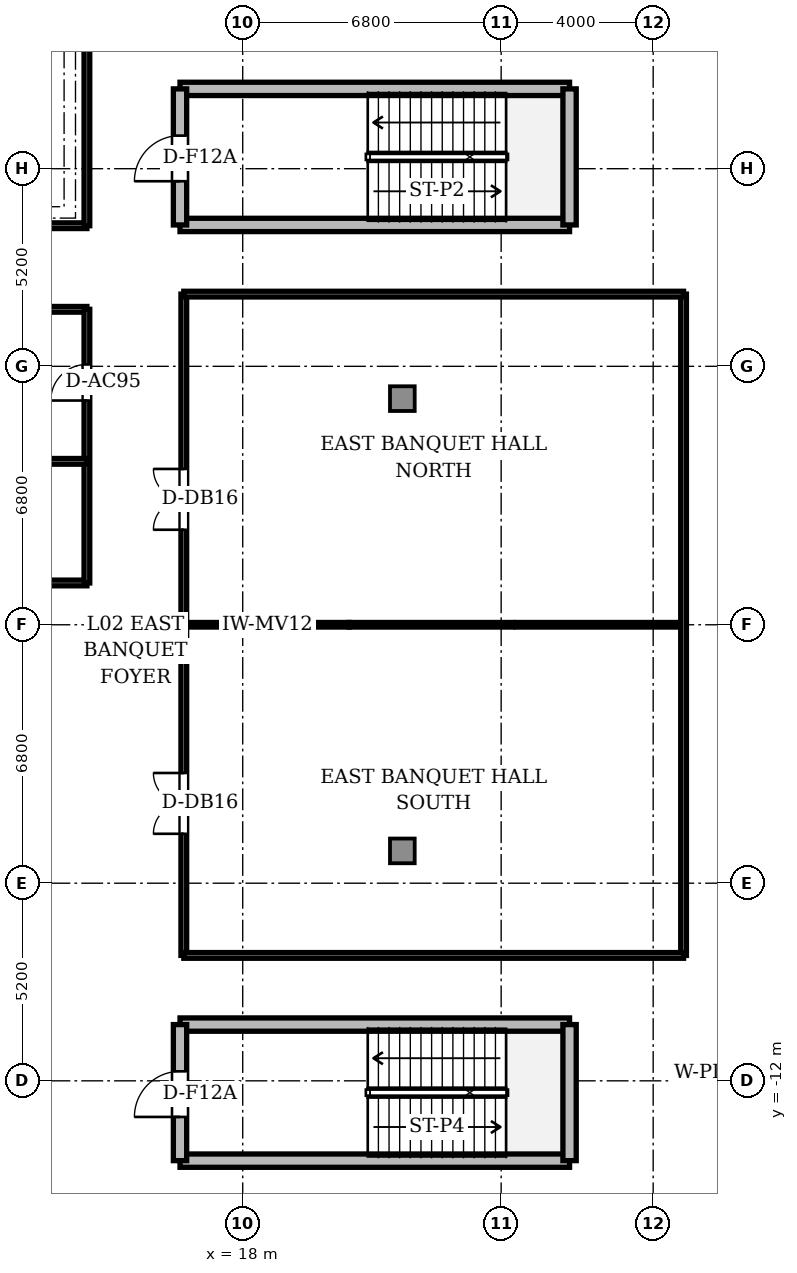
"""IFC4 building model, lengths in metres.
Left out: names, types, materials, properties, quantities, classifications, styles, units other than length and angle.
Written with IfcOpenShell. Run it as: python <this file> out.ifc"""

import sys

from ifc_helpers import new_model, si_unit, direction, frame, frame_2d, origin, origin_2d, place, context, subcontext, project, spatial, rectangle, hollow_rectangle, extrude, source, transform, mapped, element, fill, save


model = new_model("IFC4")
c1 = context("Model", 3, precision=1e-05, world=origin(), true_north=direction((0.0, 1.0)))
c2 = subcontext(c1, "Body", "Model", "MODEL_VIEW")
j1 = project(units=[si_unit("LENGTHUNIT", "METRE"), si_unit("PLANEANGLEUNIT", "RADIAN")], contexts=[c1])
p1 = place(None, origin())
s1 = spatial("IfcSite", under=j1, at=p1, CompositionType="ELEMENT")
p2 = place(p1, origin())
s2 = spatial("IfcBuilding", under=s1, at=p2, CompositionType="ELEMENT")
p3 = place(p2, frame((0.0, 0.0, 9.3)))
s3 = spatial("IfcBuildingStorey", under=s2, at=p3, CompositionType="ELEMENT", Elevation=9.3)
m1 = source(origin(), c2, "Body", "SweptSolid", [
    extrude(hollow_rectangle(XDim=0.65, YDim=0.65, WallThickness=0.032, at=origin_2d()), origin(), (0.0, 0.0, 1.0), 4.4),
])
for number, where, z_axis, x_axis in (
    (1, (22.2, -5.95, 0.0), (0.0, 0.0, 1.0), (1.0, 0.0, 0.0)),
    (2, (22.2, 5.95, 0.0), (0.0, 0.0, 1.0), (1.0, 0.0, 0.0)),
):
    element("IfcColumn", number, at=place(p3, frame(where, z_axis=z_axis, x_axis=x_axis)), inside=s3, PredefinedType="COLUMN", context=c2, shape_type="MappedRepresentation", body=[
        mapped(m1, transform((0.0, 0.0, 0.0), scale=1.0)),
    ])
for number, where, z_axis, x_axis in (
    (3, (16.35, 14.1, 0.0), (0.0, 0.0, 1.0), (1.0, 0.0, 0.0)),
    (4, (16.35, 10.52, 0.0), (0.0, 0.0, 1.0), (1.0, 0.0, 0.0)),
):
    element("IfcWall", number, at=place(p3, frame(where, z_axis=z_axis, x_axis=x_axis)), inside=s3, PredefinedType="SHEAR", context=c2, shape_type="SweptSolid", body=[
        extrude(rectangle(XDim=10.25, YDim=0.35, at=frame_2d((5.125, 0.0))), origin(), (0.0, 0.0, 1.0), 4.4),
    ])
p4 = place(p3, frame((16.35, 10.52, 0.0), z_axis=(0.0, 0.0, 1.0), x_axis=(0.0, 1.0, 0.0)))
e5 = element("IfcWall", 5, at=p4, inside=s3, PredefinedType="SHEAR", context=c2, shape_type="SweptSolid", body=[
    extrude(rectangle(XDim=3.58, YDim=0.35, at=frame_2d((1.79, 0.0))), origin(), (0.0, 0.0, 1.0), 4.4),
])
p5 = place(p4, frame((1.15, 0.0, 0.0)))
e6 = element("IfcOpeningElement", 6, at=p5, cuts=e5, PredefinedType="OPENING", context=c2, shape_type="SweptSolid", body=[
    extrude(rectangle(XDim=1.2, YDim=2.2, at=frame_2d((0.6, 1.1))), frame((0.0, 0.185, 0.0), z_axis=(0.0, -1.0, 0.0), x_axis=(1.0, 0.0, 0.0)), (0.0, 0.0, 1.0), 0.37),
])
p6 = place(p3, frame((26.6, 10.52, 0.0), z_axis=(0.0, 0.0, 1.0), x_axis=(0.0, 1.0, 0.0)))
e7 = element("IfcWall", 7, at=p6, inside=s3, PredefinedType="SHEAR", context=c2, shape_type="SweptSolid", body=[
    extrude(rectangle(XDim=3.58, YDim=0.35, at=frame_2d((1.79, 0.0))), origin(), (0.0, 0.0, 1.0), 4.4),
])
for number, where, z_axis, x_axis in (
    (8, (16.35, -10.52, 0.0), (0.0, 0.0, 1.0), (1.0, 0.0, 0.0)),
    (9, (16.35, -14.1, 0.0), (0.0, 0.0, 1.0), (1.0, 0.0, 0.0)),
):
    element("IfcWall", number, at=place(p3, frame(where, z_axis=z_axis, x_axis=x_axis)), inside=s3, PredefinedType="SHEAR", context=c2, shape_type="SweptSolid", body=[
        extrude(rectangle(XDim=10.25, YDim=0.35, at=frame_2d((5.125, 0.0))), origin(), (0.0, 0.0, 1.0), 4.4),
    ])
p7 = place(p3, frame((16.35, -14.1, 0.0), z_axis=(0.0, 0.0, 1.0), x_axis=(0.0, 1.0, 0.0)))
e10 = element("IfcWall", 10, at=p7, inside=s3, PredefinedType="SHEAR", context=c2, shape_type="SweptSolid", body=[
    extrude(rectangle(XDim=3.58, YDim=0.35, at=frame_2d((1.79, 0.0))), origin(), (0.0, 0.0, 1.0), 4.4),
])
p8 = place(p7, frame((1.15, 0.0, 0.0)))
e11 = element("IfcOpeningElement", 11, at=p8, cuts=e10, PredefinedType="OPENING", context=c2, shape_type="SweptSolid", body=[
    extrude(rectangle(XDim=1.2, YDim=2.2, at=frame_2d((0.6, 1.1))), frame((0.0, 0.185, 0.0), z_axis=(0.0, -1.0, 0.0), x_axis=(1.0, 0.0, 0.0)), (0.0, 0.0, 1.0), 0.37),
])
p9 = place(p3, frame((26.6, -14.1, 0.0), z_axis=(0.0, 0.0, 1.0), x_axis=(0.0, 1.0, 0.0)))
e12 = element("IfcWall", 12, at=p9, inside=s3, PredefinedType="SHEAR", context=c2, shape_type="SweptSolid", body=[
    extrude(rectangle(XDim=3.58, YDim=0.35, at=frame_2d((1.79, 0.0))), origin(), (0.0, 0.0, 1.0), 4.4),
])
p10 = place(p3, frame((4.4, 10.5, 0.0), z_axis=(0.0, 0.0, 1.0), x_axis=(1.0, 0.0, 0.0)))
e13 = element("IfcWall", 13, at=p10, inside=s3, PredefinedType="PARTITIONING", context=c2, shape_type="SweptSolid", body=[
    extrude(rectangle(XDim=9.5, YDim=0.15, at=frame_2d((4.75, 0.0))), origin(), (0.0, 0.0, 1.0), 3.95),
])
p11 = place(p10, frame((3.8, 0.0, 0.0)))
e14 = element("IfcOpeningElement", 14, at=p11, cuts=e13, PredefinedType="OPENING", context=c2, shape_type="SweptSolid", body=[
    extrude(rectangle(XDim=1.8, YDim=2.35, at=frame_2d((0.9, 1.175))), frame((0.0, 0.085, 0.0), z_axis=(0.0, -1.0, 0.0), x_axis=(1.0, 0.0, 0.0)), (0.0, 0.0, 1.0), 0.17),
])
p12 = place(p3, frame((13.9, 10.5, 0.0), z_axis=(0.0, 0.0, 1.0), x_axis=(0.0, 1.0, 0.0)))
e15 = element("IfcWall", 15, at=p12, inside=s3, PredefinedType="PARTITIONING", context=c2, shape_type="SweptSolid", body=[
    extrude(rectangle(XDim=11.2, YDim=0.15, at=frame_2d((5.6, 0.0))), origin(), (0.0, 0.0, 1.0), 3.95),
])
p13 = place(p3, frame((16.45, -8.7, 0.0), z_axis=(0.0, 0.0, 1.0), x_axis=(0.0, 1.0, 0.0)))
e16 = element("IfcWall", 16, at=p13, inside=s3, PredefinedType="PARTITIONING", context=c2, shape_type="SweptSolid", body=[
    extrude(rectangle(XDim=17.4, YDim=0.15, at=frame_2d((8.7, 0.0))), origin(), (0.0, 0.0, 1.0), 3.95),
])
p14 = place(p13, frame((11.2, 0.0, 0.0)))
e17 = element("IfcOpeningElement", 17, at=p14, cuts=e16, PredefinedType="OPENING", context=c2, shape_type="SweptSolid", body=[
    extrude(rectangle(XDim=1.6, YDim=2.25, at=frame_2d((0.8, 1.125))), frame((0.0, 0.085, 0.0), z_axis=(0.0, -1.0, 0.0), x_axis=(1.0, 0.0, 0.0)), (0.0, 0.0, 1.0), 0.17),
])
p15 = place(p13, frame((3.2, 0.0, 0.0)))
e18 = element("IfcOpeningElement", 18, at=p15, cuts=e16, PredefinedType="OPENING", context=c2, shape_type="SweptSolid", body=[
    extrude(rectangle(XDim=1.6, YDim=2.25, at=frame_2d((0.8, 1.125))), frame((0.0, 0.085, 0.0), z_axis=(0.0, -1.0, 0.0), x_axis=(1.0, 0.0, 0.0)), (0.0, 0.0, 1.0), 0.17),
])
p16 = place(p3, frame((29.6, -8.7, 0.0), z_axis=(0.0, 0.0, 1.0), x_axis=(0.0, 1.0, 0.0)))
e19 = element("IfcWall", 19, at=p16, inside=s3, PredefinedType="PARTITIONING", context=c2, shape_type="SweptSolid", body=[
    extrude(rectangle(XDim=17.4, YDim=0.15, at=frame_2d((8.7, 0.0))), origin(), (0.0, 0.0, 1.0), 3.95),
])
for number, where, z_axis, x_axis in (
    (20, (16.45, 8.7, 0.0), (0.0, 0.0, 1.0), (1.0, 0.0, 0.0)),
    (21, (16.45, -8.7, 0.0), (0.0, 0.0, 1.0), (1.0, 0.0, 0.0)),
):
    element("IfcWall", number, at=place(p3, frame(where, z_axis=z_axis, x_axis=x_axis)), inside=s3, PredefinedType="PARTITIONING", context=c2, shape_type="SweptSolid", body=[
        extrude(rectangle(XDim=13.15, YDim=0.15, at=frame_2d((6.575, 0.0))), origin(), (0.0, 0.0, 1.0), 3.95),
    ])
for number, where, z_axis, x_axis in (
    (22, (16.5, 0.0, 0.0), (0.0, 0.0, 1.0), (1.0, 0.0, 0.0)),
    (23, (20.8, 0.0, 0.0), (0.0, 0.0, 1.0), (1.0, 0.0, 0.0)),
    (24, (25.2, 0.0, 0.0), (0.0, 0.0, 1.0), (1.0, 0.0, 0.0)),
):
    element("IfcWall", number, at=place(p3, frame(where, z_axis=z_axis, x_axis=x_axis)), inside=s3, PredefinedType="MOVABLE", context=c2, shape_type="SweptSolid", body=[
        extrude(rectangle(XDim=4.3, YDim=0.12, at=frame_2d((2.15, 0.0))), origin(), (0.0, 0.0, 1.0), 3.95),
    ])
p17 = place(p3, frame((6.3, 1.1, 0.0), z_axis=(0.0, 0.0, 1.0), x_axis=(1.0, 0.0, 0.0)))
e25 = element("IfcWall", 25, at=p17, inside=s3, PredefinedType="PARTITIONING", context=c2, shape_type="SweptSolid", body=[
    extrude(rectangle(XDim=7.6, YDim=0.15, at=frame_2d((3.8, 0.0))), origin(), (0.0, 0.0, 1.0), 3.95),
])
p18 = place(p17, frame((1.8, 0.0, 0.0)))
e26 = element("IfcOpeningElement", 26, at=p18, cuts=e25, PredefinedType="OPENING", context=c2, shape_type="SweptSolid", body=[
    extrude(rectangle(XDim=0.95, YDim=2.15, at=frame_2d((0.475, 1.075))), frame((0.0, 0.085, 0.0), z_axis=(0.0, -1.0, 0.0), x_axis=(1.0, 0.0, 0.0)), (0.0, 0.0, 1.0), 0.17),
])
p19 = place(p3, frame((6.3, 8.3, 0.0), z_axis=(0.0, 0.0, 1.0), x_axis=(1.0, 0.0, 0.0)))
e27 = element("IfcWall", 27, at=p19, inside=s3, PredefinedType="PARTITIONING", context=c2, shape_type="SweptSolid", body=[
    extrude(rectangle(XDim=7.6, YDim=0.15, at=frame_2d((3.8, 0.0))), origin(), (0.0, 0.0, 1.0), 3.95),
])
p20 = place(p3, frame((13.9, 1.1, 0.0), z_axis=(0.0, 0.0, 1.0), x_axis=(0.0, 1.0, 0.0)))
e28 = element("IfcWall", 28, at=p20, inside=s3, PredefinedType="PARTITIONING", context=c2, shape_type="SweptSolid", body=[
    extrude(rectangle(XDim=7.2, YDim=0.15, at=frame_2d((3.6, 0.0))), origin(), (0.0, 0.0, 1.0), 3.95),
])
p21 = place(p20, frame((4.8, 0.0, 0.0)))
e29 = element("IfcOpeningElement", 29, at=p21, cuts=e28, PredefinedType="OPENING", context=c2, shape_type="SweptSolid", body=[
    extrude(rectangle(XDim=0.95, YDim=2.15, at=frame_2d((0.475, 1.075))), frame((0.0, 0.085, 0.0), z_axis=(0.0, -1.0, 0.0), x_axis=(1.0, 0.0, 0.0)), (0.0, 0.0, 1.0), 0.17),
])
p22 = place(p3, frame((11.1, 4.3, 0.0), z_axis=(0.0, 0.0, 1.0), x_axis=(1.0, 0.0, 0.0)))
e30 = element("IfcWall", 30, at=p22, inside=s3, PredefinedType="PARTITIONING", context=c2, shape_type="SweptSolid", body=[
    extrude(rectangle(XDim=2.8, YDim=0.15, at=frame_2d((1.4, 0.0))), origin(), (0.0, 0.0, 1.0), 2.87),
])
m2 = source(origin(), c2, "Body", "SweptSolid", [
    extrude(rectangle(XDim=1.2, YDim=0.05, at=origin_2d()), origin(), (0.0, 0.0, 1.0), 2.2),
])
p23 = place(p5, frame((0.6, 0.0, 0.0)))
e31 = element("IfcDoor", 31, at=p23, inside=s3, OperationType="SINGLE_SWING_LEFT", PredefinedType="DOOR", context=c2, shape_type="MappedRepresentation", body=[
    mapped(m2, transform((0.0, 0.0, 0.0), scale=1.0)),
])
fill(e6, e31)
p24 = place(p8, frame((0.6, 0.0, 0.0)))
e32 = element("IfcDoor", 32, at=p24, inside=s3, OperationType="SINGLE_SWING_LEFT", PredefinedType="DOOR", context=c2, shape_type="MappedRepresentation", body=[
    mapped(m2, transform((0.0, 0.0, 0.0), scale=1.0)),
])
fill(e11, e32)
m3 = source(origin(), c2, "Body", "SweptSolid", [
    extrude(rectangle(XDim=1.6, YDim=0.05, at=origin_2d()), origin(), (0.0, 0.0, 1.0), 2.25),
])
p25 = place(p14, frame((0.8, 0.0, 0.0)))
e33 = element("IfcDoor", 33, at=p25, inside=s3, OperationType="DOUBLE_DOOR_SINGLE_SWING", PredefinedType="DOOR", context=c2, shape_type="MappedRepresentation", body=[
    mapped(m3, transform((0.0, 0.0, 0.0), scale=1.0)),
])
fill(e17, e33)
p26 = place(p15, frame((0.8, 0.0, 0.0)))
e34 = element("IfcDoor", 34, at=p26, inside=s3, OperationType="DOUBLE_DOOR_SINGLE_SWING", PredefinedType="DOOR", context=c2, shape_type="MappedRepresentation", body=[
    mapped(m3, transform((0.0, 0.0, 0.0), scale=1.0)),
])
fill(e18, e34)
m4 = source(origin(), c2, "Body", "SweptSolid", [
    extrude(rectangle(XDim=0.95, YDim=0.05, at=origin_2d()), origin(), (0.0, 0.0, 1.0), 2.15),
])
p27 = place(p21, frame((0.475, 0.0, 0.0)))
e35 = element("IfcDoor", 35, at=p27, inside=s3, OperationType="SINGLE_SWING_LEFT", PredefinedType="DOOR", context=c2, shape_type="MappedRepresentation", body=[
    mapped(m4, transform((0.0, 0.0, 0.0), scale=1.0)),
])
fill(e29, e35)
save(model, sys.argv[1])
